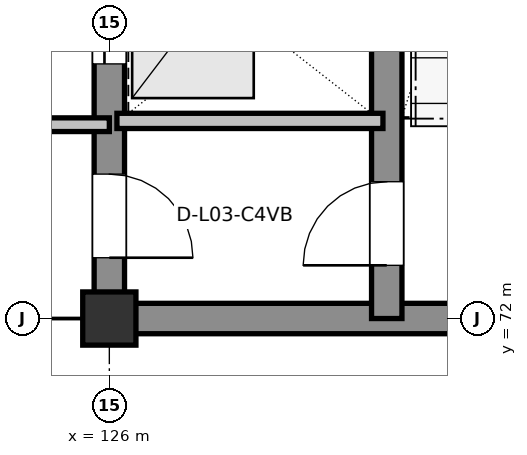
"""IFC4 building model, lengths in metres.
Left out: names, types, materials, properties, quantities, classifications, styles, units other than length and angle.
Written with IfcOpenShell. Run it as: python <this file> out.ifc"""

import sys

from ifc_helpers import new_model, si_unit, direction, frame, frame_2d, origin, origin_2d, place, context, subcontext, project, spatial, rectangle, extrude, element, fill, save


model = new_model("IFC4")
c1 = context("Model", 3, precision=1e-05, world=origin(), true_north=direction((0.0, 1.0)))
c2 = subcontext(c1, "Body", "Model", "MODEL_VIEW")
j1 = project(units=[si_unit("LENGTHUNIT", "METRE"), si_unit("PLANEANGLEUNIT", "RADIAN")], contexts=[c1])
p1 = place(None, origin())
s1 = spatial("IfcSite", under=j1, at=p1, CompositionType="ELEMENT")
p2 = place(p1, origin())
s2 = spatial("IfcBuilding", under=s1, at=p2, CompositionType="ELEMENT")
p3 = place(p2, frame((0.0, 0.0, 15.0)))
s3 = spatial("IfcBuildingStorey", under=s2, at=p3, CompositionType="ELEMENT", Elevation=15.0)
p4 = place(p3, frame((126.0, 72.0, 0.0), z_axis=(0.0, 0.0, 1.0), x_axis=(1.0, 0.0, 0.0)))
e1 = element("IfcColumn", 1, at=p4, inside=s3, PredefinedType="COLUMN", context=c2, shape_type="SweptSolid", body=[
    extrude(rectangle(XDim=0.7, YDim=0.7, at=origin_2d()), origin(), (0.0, 0.0, 1.0), 4.2),
])
p5 = place(p3, frame((126.0, 72.0, 0.0), z_axis=(0.0, 0.0, 1.0), x_axis=(1.0, 0.0, 0.0)))
e2 = element("IfcWall", 2, at=p5, inside=s3, PredefinedType="SHEAR", context=c2, shape_type="SweptSolid", body=[
    extrude(rectangle(XDim=9.0, YDim=0.4, at=frame_2d((4.5, 0.0))), origin(), (0.0, 0.0, 1.0), 3.96),
])
p6 = place(p3, frame((126.0, 90.0, 0.0), z_axis=(0.0, 0.0, 1.0), x_axis=(0.0, -1.0, 0.0)))
e3 = element("IfcWall", 3, at=p6, inside=s3, PredefinedType="SHEAR", context=c2, shape_type="SweptSolid", body=[
    extrude(rectangle(XDim=18.0, YDim=0.4, at=frame_2d((9.0, 0.0))), origin(), (0.0, 0.0, 1.0), 3.96),
])
p7 = place(p6, frame((16.1, 0.0, 0.0)))
e4 = element("IfcOpeningElement", 4, at=p7, cuts=e3, PredefinedType="OPENING", context=c2, shape_type="SweptSolid", body=[
    extrude(rectangle(XDim=1.1, YDim=2.16, at=frame_2d((0.55, 1.08))), frame((0.0, 0.21, 0.0), z_axis=(0.0, -1.0, 0.0), x_axis=(1.0, 0.0, 0.0)), (0.0, 0.0, 1.0), 0.42),
])
p8 = place(p6, frame((13.45, 0.0, 0.0)))
e5 = element("IfcOpeningElement", 5, at=p8, cuts=e3, PredefinedType="OPENING", context=c2, shape_type="SweptSolid", body=[
    extrude(rectangle(XDim=1.2, YDim=2.2, at=frame_2d((0.6, 1.1))), frame((0.0, 0.21, 0.0), z_axis=(0.0, -1.0, 0.0), x_axis=(1.0, 0.0, 0.0)), (0.0, 0.0, 1.0), 0.42),
])
p9 = place(p6, frame((10.65, 0.0, 0.0)))
e6 = element("IfcOpeningElement", 6, at=p9, cuts=e3, PredefinedType="OPENING", context=c2, shape_type="SweptSolid", body=[
    extrude(rectangle(XDim=1.2, YDim=2.2, at=frame_2d((0.6, 1.1))), frame((0.0, 0.21, 0.0), z_axis=(0.0, -1.0, 0.0), x_axis=(1.0, 0.0, 0.0)), (0.0, 0.0, 1.0), 0.42),
])
p10 = place(p6, frame((5.9, 0.0, 0.0)))
e7 = element("IfcOpeningElement", 7, at=p10, cuts=e3, PredefinedType="OPENING", context=c2, shape_type="SweptSolid", body=[
    extrude(rectangle(XDim=1.8, YDim=2.35, at=frame_2d((0.9, 1.175))), frame((0.0, 0.21, 0.0), z_axis=(0.0, -1.0, 0.0), x_axis=(1.0, 0.0, 0.0)), (0.0, 0.0, 1.0), 0.42),
])
p11 = place(p3, frame((129.65, 72.0, 0.0), z_axis=(0.0, 0.0, 1.0), x_axis=(0.0, 1.0, 0.0)))
e8 = element("IfcWall", 8, at=p11, inside=s3, PredefinedType="SHEAR", context=c2, shape_type="SweptSolid", body=[
    extrude(rectangle(XDim=18.0, YDim=0.4, at=frame_2d((9.0, 0.0))), origin(), (0.0, 0.0, 1.0), 3.96),
])
p12 = place(p11, frame((0.7, 0.0, 0.0)))
e9 = element("IfcOpeningElement", 9, at=p12, cuts=e8, PredefinedType="OPENING", context=c2, shape_type="SweptSolid", body=[
    extrude(rectangle(XDim=1.1, YDim=2.16, at=frame_2d((0.55, 1.08))), frame((0.0, 0.21, 0.0), z_axis=(0.0, -1.0, 0.0), x_axis=(1.0, 0.0, 0.0)), (0.0, 0.0, 1.0), 0.42),
])
p13 = place(p3, frame((126.1, 74.6, 0.0), z_axis=(0.0, 0.0, 1.0), x_axis=(1.0, 0.0, 0.0)))
e10 = element("IfcWall", 10, at=p13, inside=s3, PredefinedType="PARTITIONING", context=c2, shape_type="SweptSolid", body=[
    extrude(rectangle(XDim=3.5, YDim=0.2, at=frame_2d((1.75, 0.0))), origin(), (0.0, 0.0, 1.0), 3.96),
])
p14 = place(p3, frame((122.25, 74.55, 0.0), z_axis=(0.0, 0.0, 1.0), x_axis=(1.0, 0.0, 0.0)))
e11 = element("IfcWall", 11, at=p14, inside=s3, PredefinedType="PARTITIONING", context=c2, shape_type="SweptSolid", body=[
    extrude(rectangle(XDim=3.75, YDim=0.18, at=frame_2d((1.875, 0.0))), origin(), (0.0, 0.0, 1.0), 3.96),
])
p15 = place(p12, origin())
e12 = element("IfcDoor", 12, at=p15, inside=s3, OperationType="SINGLE_SWING_LEFT", PredefinedType="DOOR", context=c2, shape_type="SweptSolid", body=[
    extrude(rectangle(XDim=1.1, YDim=2.16, at=frame_2d((0.55, 1.08))), frame((0.0, 0.025, 0.0), z_axis=(0.0, -1.0, 0.0), x_axis=(1.0, 0.0, 0.0)), (0.0, 0.0, 1.0), 0.05),
])
fill(e9, e12)
p16 = place(p7, origin())
e13 = element("IfcDoor", 13, at=p16, inside=s3, OperationType="SINGLE_SWING_RIGHT", PredefinedType="DOOR", context=c2, shape_type="SweptSolid", body=[
    extrude(rectangle(XDim=1.1, YDim=2.16, at=frame_2d((0.55, 1.08))), frame((0.0, 0.025, 0.0), z_axis=(0.0, -1.0, 0.0), x_axis=(1.0, 0.0, 0.0)), (0.0, 0.0, 1.0), 0.05),
])
fill(e4, e13)
p17 = place(p8, origin())
e14 = element("IfcDoor", 14, at=p17, inside=s3, OperationType="SLIDING_TO_LEFT", PredefinedType="DOOR", context=c2, shape_type="SweptSolid", body=[
    extrude(rectangle(XDim=1.2, YDim=2.2, at=frame_2d((0.6, 1.1))), frame((0.0, 0.025, 0.0), z_axis=(0.0, -1.0, 0.0), x_axis=(1.0, 0.0, 0.0)), (0.0, 0.0, 1.0), 0.05),
])
fill(e5, e14)
save(model, sys.argv[1])
